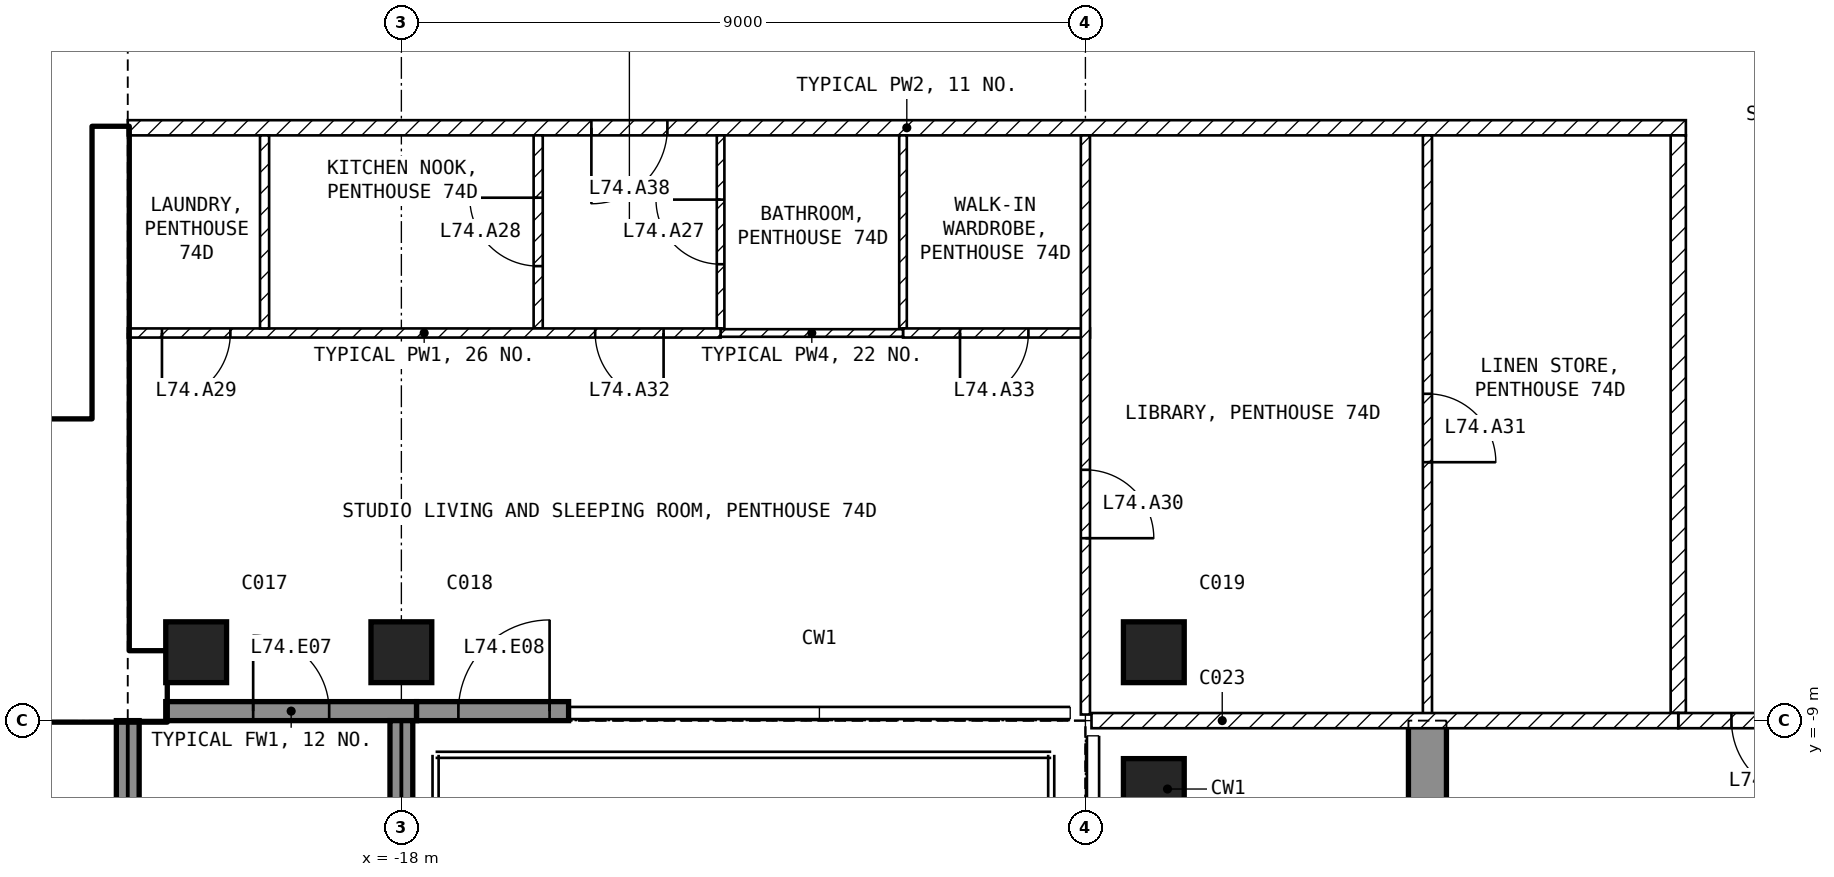
"""IFC4 building model, lengths in metres.
Left out: names, types, materials, properties, quantities, classifications, styles, units other than length and angle.
Written with IfcOpenShell. Run it as: python <this file> out.ifc"""

import sys

from ifc_helpers import new_model, si_unit, direction, frame, frame_2d, origin, origin_2d, place, context, subcontext, project, spatial, polyline, rectangle, outline, extrude, element, fill, save


model = new_model("IFC4")
c1 = context("Model", 3, precision=1e-05, world=origin(), true_north=direction((0.0, 1.0)))
c2 = subcontext(c1, "Body", "Model", "MODEL_VIEW")
j1 = project(units=[si_unit("LENGTHUNIT", "METRE"), si_unit("PLANEANGLEUNIT", "RADIAN")], contexts=[c1])
p1 = place(None, origin())
s1 = spatial("IfcSite", under=j1, at=p1, CompositionType="ELEMENT")
p2 = place(p1, origin())
s2 = spatial("IfcBuilding", under=s1, at=p2, CompositionType="ELEMENT")
p3 = place(p2, frame((0.0, 0.0, 290.4)))
s3 = spatial("IfcBuildingStorey", under=s2, at=p3, CompositionType="ELEMENT", Elevation=290.4)
for number, where, z_axis, x_axis in (
    (1, (-20.7, -8.1, -0.25), (0.0, 0.0, 1.0), (1.0, 0.0, 0.0)),
    (2, (-18.0, -8.1, -0.25), (0.0, 0.0, 1.0), (1.0, 0.0, 0.0)),
    (3, (-8.1, -9.9, -0.25), (0.0, 0.0, 1.0), (1.0, 0.0, 0.0)),
    (4, (-8.1, -8.1, -0.25), (0.0, 0.0, 1.0), (1.0, 0.0, 0.0)),
):
    element("IfcColumn", number, at=place(p3, frame(where, z_axis=z_axis, x_axis=x_axis)), inside=s3, PredefinedType="COLUMN", context=c2, shape_type="SweptSolid", body=[
        extrude(rectangle(XDim=0.8, YDim=0.8, at=origin_2d()), origin(), (0.0, 0.0, 1.0), 4.2),
    ])
p4 = place(p3, frame((-4.75, -13.1, -0.25), z_axis=(1.0, 0.0, 0.0), x_axis=(0.0, 1.0, 0.0)))
e5 = element("IfcWall", 5, at=p4, inside=s3, PredefinedType="SHEAR", context=c2, shape_type="SweptSolid", body=[
    extrude(outline(polyline([(0.0, 0.0), (4.1, 0.0), (4.1, 4.2), (0.0, 4.2), (0.0, 0.0)])), origin(), (0.0, 0.0, 1.0), 0.5),
])
p5 = place(p3, frame((-21.1, -8.875, 0.0), z_axis=(0.0, 0.0, 1.0), x_axis=(1.0, 0.0, 0.0)))
e6 = element("IfcWall", 6, at=p5, inside=s3, PredefinedType="SOLIDWALL", context=c2, shape_type="SweptSolid", body=[
    extrude(rectangle(XDim=3.3, YDim=0.25, at=frame_2d((1.65, 0.0))), origin(), (0.0, 0.0, 1.0), 3.95),
])
p6 = place(p5, frame((1.15, 0.0, 0.0)))
e7 = element("IfcOpeningElement", 7, at=p6, cuts=e6, PredefinedType="OPENING", context=c2, shape_type="SweptSolid", body=[
    extrude(rectangle(XDim=1.0, YDim=2.4, at=frame_2d((0.5, 1.2))), frame((0.0, 0.135, 0.0), z_axis=(0.0, -1.0, 0.0), x_axis=(1.0, 0.0, 0.0)), (0.0, 0.0, 1.0), 0.27),
])
p7 = place(p3, frame((-17.8, -8.875, 0.0), z_axis=(0.0, 0.0, 1.0), x_axis=(1.0, 0.0, 0.0)))
e8 = element("IfcWall", 8, at=p7, inside=s3, PredefinedType="SOLIDWALL", context=c2, shape_type="SweptSolid", body=[
    extrude(rectangle(XDim=2.0, YDim=0.25, at=frame_2d((1.0, 0.0))), origin(), (0.0, 0.0, 1.0), 3.95),
])
p8 = place(p7, frame((0.55, 0.0, 0.0)))
e9 = element("IfcOpeningElement", 9, at=p8, cuts=e8, PredefinedType="OPENING", context=c2, shape_type="SweptSolid", body=[
    extrude(rectangle(XDim=1.2, YDim=2.4, at=frame_2d((0.6, 1.2))), frame((0.0, 0.135, 0.0), z_axis=(0.0, -1.0, 0.0), x_axis=(1.0, 0.0, 0.0)), (0.0, 0.0, 1.0), 0.27),
])
p9 = place(p3, frame((-21.6, -9.0, 0.0), z_axis=(0.0, 0.0, 1.0), x_axis=(0.0, -1.0, 0.0)))
e10 = element("IfcWall", 10, at=p9, inside=s3, PredefinedType="SOLIDWALL", context=c2, shape_type="SweptSolid", body=[
    extrude(rectangle(XDim=2.7, YDim=0.3, at=frame_2d((1.35, 0.0))), origin(), (0.0, 0.0, 1.0), 3.95),
])
p10 = place(p3, frame((-18.0, -9.0, 0.0), z_axis=(0.0, 0.0, 1.0), x_axis=(0.0, -1.0, 0.0)))
e11 = element("IfcWall", 11, at=p10, inside=s3, PredefinedType="SOLIDWALL", context=c2, shape_type="SweptSolid", body=[
    extrude(rectangle(XDim=2.74, YDim=0.3, at=frame_2d((1.37, 0.0))), origin(), (0.0, 0.0, 1.0), 3.95),
])
p11 = place(p3, frame((-30.2, -8.55, 0.0), z_axis=(0.0, 0.0, 1.0), x_axis=(1.0, 0.0, 0.0)))
e12 = element("IfcWall", 12, at=p11, inside=s3, PredefinedType="SHEAR", context=c2, shape_type="SweptSolid", body=[
    extrude(rectangle(XDim=9.1, YDim=0.9, at=frame_2d((4.55, 0.0))), origin(), (0.0, 0.0, 1.0), 3.95),
])
p12 = place(p3, frame((-21.825, -8.1, 0.0), z_axis=(0.0, 0.0, 1.0), x_axis=(0.0, 1.0, 0.0)))
e13 = element("IfcWall", 13, at=p12, inside=s3, PredefinedType="SHEAR", context=c2, shape_type="SweptSolid", body=[
    extrude(rectangle(XDim=6.9, YDim=0.45, at=frame_2d((3.45, 0.0))), origin(), (0.0, 0.0, 1.0), 3.95),
])
p13 = place(p3, frame((-28.35, -5.15, 0.0), z_axis=(0.0, 0.0, 1.0), x_axis=(1.0, 0.0, 0.0)))
e14 = element("IfcWall", 14, at=p13, inside=s3, PredefinedType="SOLIDWALL", context=c2, shape_type="SweptSolid", body=[
    extrude(rectangle(XDim=6.3, YDim=0.2, at=frame_2d((3.15, 0.0))), origin(), (0.0, 0.0, 1.0), 3.95),
])
p14 = place(p13, frame((5.1, 0.0, 0.0)))
e15 = element("IfcOpeningElement", 15, at=p14, cuts=e14, PredefinedType="OPENING", context=c2, shape_type="SweptSolid", body=[
    extrude(rectangle(XDim=1.0, YDim=2.1, at=frame_2d((0.5, 1.05))), frame((0.0, 0.11, 0.0), z_axis=(0.0, -1.0, 0.0), x_axis=(1.0, 0.0, 0.0)), (0.0, 0.0, 1.0), 0.22),
])
p15 = place(p3, frame((-1.1, -1.2, 0.0), z_axis=(0.0, 0.0, 1.0), x_axis=(-1.0, 0.0, 0.0)))
e16 = element("IfcWall", 16, at=p15, inside=s3, PredefinedType="PARTITIONING", context=c2, shape_type="SweptSolid", body=[
    extrude(rectangle(XDim=20.5, YDim=0.2, at=frame_2d((10.25, 0.0))), origin(), (0.0, 0.0, 1.0), 3.95),
])
p16 = place(p15, frame((13.4, 0.0, 0.0)))
e17 = element("IfcOpeningElement", 17, at=p16, cuts=e16, PredefinedType="OPENING", context=c2, shape_type="SweptSolid", body=[
    extrude(rectangle(XDim=1.0, YDim=2.1, at=frame_2d((0.5, 1.05))), frame((0.0, 0.11, 0.0), z_axis=(0.0, -1.0, 0.0), x_axis=(1.0, 0.0, 0.0)), (0.0, 0.0, 1.0), 0.22),
])
p17 = place(p3, frame((-1.2, -8.9, 0.0), z_axis=(0.0, 0.0, 1.0), x_axis=(0.0, 1.0, 0.0)))
e18 = element("IfcWall", 18, at=p17, inside=s3, PredefinedType="PARTITIONING", context=c2, shape_type="SweptSolid", body=[
    extrude(rectangle(XDim=7.6, YDim=0.2, at=frame_2d((3.8, 0.0))), origin(), (0.0, 0.0, 1.0), 3.95),
])
p18 = place(p3, frame((1.2, -9.0, 0.0), z_axis=(0.0, 0.0, 1.0), x_axis=(-1.0, 0.0, 0.0)))
e19 = element("IfcWall", 19, at=p18, inside=s3, PredefinedType="PARTITIONING", context=c2, shape_type="SweptSolid", body=[
    extrude(rectangle(XDim=2.4, YDim=0.2, at=frame_2d((1.2, 0.0))), origin(), (0.0, 0.0, 1.0), 3.95),
])
p19 = place(p18, frame((0.7, 0.0, 0.0)))
e20 = element("IfcOpeningElement", 20, at=p19, cuts=e19, PredefinedType="OPENING", context=c2, shape_type="SweptSolid", body=[
    extrude(rectangle(XDim=1.0, YDim=2.1, at=frame_2d((0.5, 1.05))), frame((0.0, 0.11, 0.0), z_axis=(0.0, -1.0, 0.0), x_axis=(1.0, 0.0, 0.0)), (0.0, 0.0, 1.0), 0.22),
])
p20 = place(p3, frame((-11.4, -3.84, 0.0), z_axis=(0.0, 0.0, 1.0), x_axis=(0.0, 1.0, 0.0)))
e21 = element("IfcWall", 21, at=p20, inside=s3, PredefinedType="PARTITIONING", context=c2, shape_type="SweptSolid", body=[
    extrude(rectangle(XDim=2.54, YDim=0.1, at=frame_2d((1.27, 0.0))), origin(), (0.0, 0.0, 1.0), 3.95),
])
p21 = place(p3, frame((-8.94, -3.9, 0.0), z_axis=(0.0, 0.0, 1.0), x_axis=(-1.0, 0.0, 0.0)))
e22 = element("IfcWall", 22, at=p21, inside=s3, PredefinedType="PARTITIONING", context=c2, shape_type="SweptSolid", body=[
    extrude(rectangle(XDim=2.46, YDim=0.12, at=frame_2d((1.23, 0.0))), origin(), (0.0, 0.0, 1.0), 3.95),
])
p22 = place(p21, frame((0.81, 0.0, 0.0)))
e23 = element("IfcOpeningElement", 23, at=p22, cuts=e22, PredefinedType="OPENING", context=c2, shape_type="SweptSolid", body=[
    extrude(rectangle(XDim=0.9, YDim=2.1, at=frame_2d((0.45, 1.05))), frame((0.0, 0.07, 0.0), z_axis=(0.0, -1.0, 0.0), x_axis=(1.0, 0.0, 0.0)), (0.0, 0.0, 1.0), 0.14),
])
p23 = place(p3, frame((-9.0, -1.3, 0.0), z_axis=(0.0, 0.0, 1.0), x_axis=(0.0, -1.0, 0.0)))
e24 = element("IfcWall", 24, at=p23, inside=s3, PredefinedType="PARTITIONING", context=c2, shape_type="SweptSolid", body=[
    extrude(rectangle(XDim=7.62, YDim=0.12, at=frame_2d((3.81, 0.0))), origin(), (0.0, 0.0, 1.0), 3.95),
])
p24 = place(p23, frame((4.4, 0.0, 0.0)))
e25 = element("IfcOpeningElement", 25, at=p24, cuts=e24, PredefinedType="OPENING", context=c2, shape_type="SweptSolid", body=[
    extrude(rectangle(XDim=0.9, YDim=2.1, at=frame_2d((0.45, 1.05))), frame((0.0, 0.07, 0.0), z_axis=(0.0, -1.0, 0.0), x_axis=(1.0, 0.0, 0.0)), (0.0, 0.0, 1.0), 0.14),
])
p25 = place(p3, frame((-13.8, -3.84, 0.0), z_axis=(0.0, 0.0, 1.0), x_axis=(0.0, 1.0, 0.0)))
e26 = element("IfcWall", 26, at=p25, inside=s3, PredefinedType="PARTITIONING", context=c2, shape_type="SweptSolid", body=[
    extrude(rectangle(XDim=2.54, YDim=0.1, at=frame_2d((1.27, 0.0))), origin(), (0.0, 0.0, 1.0), 3.95),
])
p26 = place(p25, frame((0.845, 0.0, 0.0)))
e27 = element("IfcOpeningElement", 27, at=p26, cuts=e26, PredefinedType="OPENING", context=c2, shape_type="SweptSolid", body=[
    extrude(rectangle(XDim=0.85, YDim=2.1, at=frame_2d((0.425, 1.05))), frame((0.0, 0.06, 0.0), z_axis=(0.0, -1.0, 0.0), x_axis=(1.0, 0.0, 0.0)), (0.0, 0.0, 1.0), 0.12),
])
p27 = place(p3, frame((-11.4, -3.9, 0.0), z_axis=(0.0, 0.0, 1.0), x_axis=(-1.0, 0.0, 0.0)))
e28 = element("IfcWall", 28, at=p27, inside=s3, PredefinedType="PARTITIONING", context=c2, shape_type="SweptSolid", body=[
    extrude(rectangle(XDim=2.4, YDim=0.1, at=frame_2d((1.2, 0.0))), origin(), (0.0, 0.0, 1.0), 3.95),
])
p28 = place(p3, frame((-16.2, -3.84, 0.0), z_axis=(0.0, 0.0, 1.0), x_axis=(0.0, 1.0, 0.0)))
e29 = element("IfcWall", 29, at=p28, inside=s3, PredefinedType="PARTITIONING", context=c2, shape_type="SweptSolid", body=[
    extrude(rectangle(XDim=2.54, YDim=0.12, at=frame_2d((1.27, 0.0))), origin(), (0.0, 0.0, 1.0), 3.95),
])
p29 = place(p28, frame((0.82, 0.0, 0.0)))
e30 = element("IfcOpeningElement", 30, at=p29, cuts=e29, PredefinedType="OPENING", context=c2, shape_type="SweptSolid", body=[
    extrude(rectangle(XDim=0.9, YDim=2.1, at=frame_2d((0.45, 1.05))), frame((0.0, 0.07, 0.0), z_axis=(0.0, -1.0, 0.0), x_axis=(1.0, 0.0, 0.0)), (0.0, 0.0, 1.0), 0.14),
])
p30 = place(p3, frame((-13.8, -3.9, 0.0), z_axis=(0.0, 0.0, 1.0), x_axis=(-1.0, 0.0, 0.0)))
e31 = element("IfcWall", 31, at=p30, inside=s3, PredefinedType="PARTITIONING", context=c2, shape_type="SweptSolid", body=[
    extrude(rectangle(XDim=7.8, YDim=0.12, at=frame_2d((3.9, 0.0))), origin(), (0.0, 0.0, 1.0), 3.95),
])
p31 = place(p30, frame((6.45, 0.0, 0.0)))
e32 = element("IfcOpeningElement", 32, at=p31, cuts=e31, PredefinedType="OPENING", context=c2, shape_type="SweptSolid", body=[
    extrude(rectangle(XDim=0.9, YDim=2.1, at=frame_2d((0.45, 1.05))), frame((0.0, 0.07, 0.0), z_axis=(0.0, -1.0, 0.0), x_axis=(1.0, 0.0, 0.0)), (0.0, 0.0, 1.0), 0.14),
])
p32 = place(p30, frame((0.75, 0.0, 0.0)))
e33 = element("IfcOpeningElement", 33, at=p32, cuts=e31, PredefinedType="OPENING", context=c2, shape_type="SweptSolid", body=[
    extrude(rectangle(XDim=0.9, YDim=2.1, at=frame_2d((0.45, 1.05))), frame((0.0, 0.07, 0.0), z_axis=(0.0, -1.0, 0.0), x_axis=(1.0, 0.0, 0.0)), (0.0, 0.0, 1.0), 0.14),
])
p33 = place(p3, frame((-19.8, -3.84, 0.0), z_axis=(0.0, 0.0, 1.0), x_axis=(0.0, 1.0, 0.0)))
e34 = element("IfcWall", 34, at=p33, inside=s3, PredefinedType="PARTITIONING", context=c2, shape_type="SweptSolid", body=[
    extrude(rectangle(XDim=2.54, YDim=0.12, at=frame_2d((1.27, 0.0))), origin(), (0.0, 0.0, 1.0), 3.95),
])
p34 = place(p3, frame((-4.5, -1.3, 0.0), z_axis=(0.0, 0.0, 1.0), x_axis=(0.0, -1.0, 0.0)))
e35 = element("IfcWall", 35, at=p34, inside=s3, PredefinedType="PARTITIONING", context=c2, shape_type="SweptSolid", body=[
    extrude(rectangle(XDim=7.7, YDim=0.12, at=frame_2d((3.85, 0.0))), origin(), (0.0, 0.0, 1.0), 3.95),
])
p35 = place(p34, frame((3.4, 0.0, 0.0)))
e36 = element("IfcOpeningElement", 36, at=p35, cuts=e35, PredefinedType="OPENING", context=c2, shape_type="SweptSolid", body=[
    extrude(rectangle(XDim=0.9, YDim=2.1, at=frame_2d((0.45, 1.05))), frame((0.0, 0.07, 0.0), z_axis=(0.0, -1.0, 0.0), x_axis=(1.0, 0.0, 0.0)), (0.0, 0.0, 1.0), 0.14),
])
p36 = place(p3, frame((-1.2, -9.0, 0.0), z_axis=(0.0, 0.0, 1.0), x_axis=(-1.0, 0.0, 0.0)))
e37 = element("IfcWall", 37, at=p36, inside=s3, PredefinedType="PARTITIONING", context=c2, shape_type="SweptSolid", body=[
    extrude(rectangle(XDim=7.72, YDim=0.2, at=frame_2d((3.86, 0.0))), origin(), (0.0, 0.0, 1.0), 3.95),
])
p37 = place(p6, origin())
e38 = element("IfcDoor", 38, at=p37, inside=s3, OperationType="SINGLE_SWING_LEFT", PredefinedType="DOOR", context=c2, shape_type="SweptSolid", body=[
    extrude(rectangle(XDim=1.0, YDim=2.4, at=frame_2d((0.5, 1.2))), frame((0.0, 0.025, 0.0), z_axis=(0.0, -1.0, 0.0), x_axis=(1.0, 0.0, 0.0)), (0.0, 0.0, 1.0), 0.05),
])
fill(e7, e38)
p38 = place(p8, origin())
e39 = element("IfcDoor", 39, at=p38, inside=s3, OperationType="SINGLE_SWING_RIGHT", PredefinedType="DOOR", context=c2, shape_type="SweptSolid", body=[
    extrude(rectangle(XDim=1.2, YDim=2.4, at=frame_2d((0.6, 1.2))), frame((0.0, 0.025, 0.0), z_axis=(0.0, -1.0, 0.0), x_axis=(1.0, 0.0, 0.0)), (0.0, 0.0, 1.0), 0.05),
])
fill(e9, e39)
p39 = place(p14, origin())
e40 = element("IfcDoor", 40, at=p39, inside=s3, OperationType="SINGLE_SWING_LEFT", PredefinedType="DOOR", context=c2, shape_type="SweptSolid", body=[
    extrude(rectangle(XDim=1.0, YDim=2.1, at=frame_2d((0.5, 1.05))), frame((0.0, 0.025, 0.0), z_axis=(0.0, -1.0, 0.0), x_axis=(1.0, 0.0, 0.0)), (0.0, 0.0, 1.0), 0.05),
])
fill(e15, e40)
p40 = place(p26, origin())
e41 = element("IfcDoor", 41, at=p40, inside=s3, OperationType="SINGLE_SWING_RIGHT", PredefinedType="DOOR", context=c2, shape_type="SweptSolid", body=[
    extrude(rectangle(XDim=0.85, YDim=2.1, at=frame_2d((0.425, 1.05))), frame((0.0, 0.025, 0.0), z_axis=(0.0, -1.0, 0.0), x_axis=(1.0, 0.0, 0.0)), (0.0, 0.0, 1.0), 0.05),
])
fill(e27, e41)
p41 = place(p29, origin())
e42 = element("IfcDoor", 42, at=p41, inside=s3, OperationType="SINGLE_SWING_RIGHT", PredefinedType="DOOR", context=c2, shape_type="SweptSolid", body=[
    extrude(rectangle(XDim=0.9, YDim=2.1, at=frame_2d((0.45, 1.05))), frame((0.0, 0.025, 0.0), z_axis=(0.0, -1.0, 0.0), x_axis=(1.0, 0.0, 0.0)), (0.0, 0.0, 1.0), 0.05),
])
fill(e30, e42)
p42 = place(p31, origin())
e43 = element("IfcDoor", 43, at=p42, inside=s3, OperationType="SINGLE_SWING_RIGHT", PredefinedType="DOOR", context=c2, shape_type="SweptSolid", body=[
    extrude(rectangle(XDim=0.9, YDim=2.1, at=frame_2d((0.45, 1.05))), frame((0.0, 0.025, 0.0), z_axis=(0.0, -1.0, 0.0), x_axis=(1.0, 0.0, 0.0)), (0.0, 0.0, 1.0), 0.05),
])
fill(e32, e43)
p43 = place(p24, origin())
e44 = element("IfcDoor", 44, at=p43, inside=s3, OperationType="SINGLE_SWING_RIGHT", PredefinedType="DOOR", context=c2, shape_type="SweptSolid", body=[
    extrude(rectangle(XDim=0.9, YDim=2.1, at=frame_2d((0.45, 1.05))), frame((0.0, 0.025, 0.0), z_axis=(0.0, -1.0, 0.0), x_axis=(1.0, 0.0, 0.0)), (0.0, 0.0, 1.0), 0.05),
])
fill(e25, e44)
p44 = place(p35, origin())
e45 = element("IfcDoor", 45, at=p44, inside=s3, OperationType="SINGLE_SWING_RIGHT", PredefinedType="DOOR", context=c2, shape_type="SweptSolid", body=[
    extrude(rectangle(XDim=0.9, YDim=2.1, at=frame_2d((0.45, 1.05))), frame((0.0, 0.025, 0.0), z_axis=(0.0, -1.0, 0.0), x_axis=(1.0, 0.0, 0.0)), (0.0, 0.0, 1.0), 0.05),
])
fill(e36, e45)
p45 = place(p32, origin())
e46 = element("IfcDoor", 46, at=p45, inside=s3, OperationType="SINGLE_SWING_LEFT", PredefinedType="DOOR", context=c2, shape_type="SweptSolid", body=[
    extrude(rectangle(XDim=0.9, YDim=2.1, at=frame_2d((0.45, 1.05))), frame((0.0, 0.025, 0.0), z_axis=(0.0, -1.0, 0.0), x_axis=(1.0, 0.0, 0.0)), (0.0, 0.0, 1.0), 0.05),
])
fill(e33, e46)
p46 = place(p22, origin())
e47 = element("IfcDoor", 47, at=p46, inside=s3, OperationType="SINGLE_SWING_RIGHT", PredefinedType="DOOR", context=c2, shape_type="SweptSolid", body=[
    extrude(rectangle(XDim=0.9, YDim=2.1, at=frame_2d((0.45, 1.05))), frame((0.0, 0.025, 0.0), z_axis=(0.0, -1.0, 0.0), x_axis=(1.0, 0.0, 0.0)), (0.0, 0.0, 1.0), 0.05),
])
fill(e23, e47)
p47 = place(p19, origin())
e48 = element("IfcDoor", 48, at=p47, inside=s3, OperationType="SINGLE_SWING_LEFT", PredefinedType="DOOR", context=c2, shape_type="SweptSolid", body=[
    extrude(rectangle(XDim=1.0, YDim=2.1, at=frame_2d((0.5, 1.05))), frame((0.0, 0.025, 0.0), z_axis=(0.0, -1.0, 0.0), x_axis=(1.0, 0.0, 0.0)), (0.0, 0.0, 1.0), 0.05),
])
fill(e20, e48)
p48 = place(p16, origin())
e49 = element("IfcDoor", 49, at=p48, inside=s3, OperationType="SINGLE_SWING_RIGHT", PredefinedType="DOOR", context=c2, shape_type="SweptSolid", body=[
    extrude(rectangle(XDim=1.0, YDim=2.1, at=frame_2d((0.5, 1.05))), frame((0.0, 0.025, 0.0), z_axis=(0.0, -1.0, 0.0), x_axis=(1.0, 0.0, 0.0)), (0.0, 0.0, 1.0), 0.05),
])
fill(e17, e49)
save(model, sys.argv[1])
